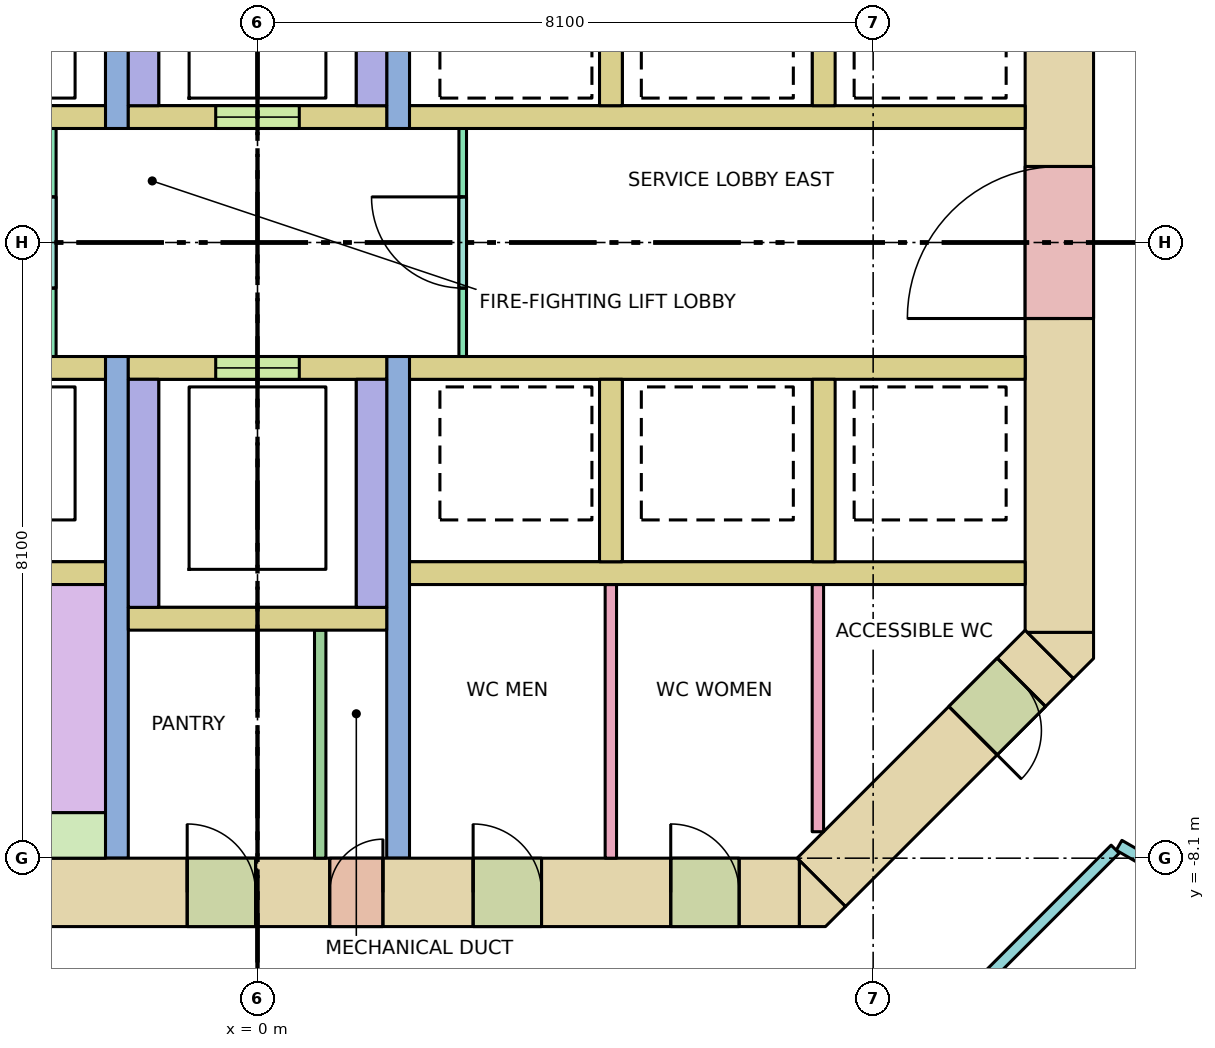
"""IFC4 building model, lengths in metres.
Left out: names, types, materials, properties, quantities, classifications, styles, units other than length and angle.
Written with IfcOpenShell. Run it as: python <this file> out.ifc"""

import sys

from ifc_helpers import new_model, si_unit, direction, frame, frame_2d, origin, place, context, subcontext, project, spatial, polyline, rectangle, outline, extrude, element, fill, save


model = new_model("IFC4")
c1 = context("Model", 3, precision=1e-05, world=origin(), true_north=direction((0.0, 1.0)))
c2 = subcontext(c1, "Body", "Model", "MODEL_VIEW")
j1 = project(units=[si_unit("LENGTHUNIT", "METRE"), si_unit("PLANEANGLEUNIT", "RADIAN")], contexts=[c1])
p1 = place(None, origin())
s1 = spatial("IfcSite", under=j1, at=p1, CompositionType="ELEMENT")
p2 = place(p1, origin())
s2 = spatial("IfcBuilding", under=s1, at=p2, CompositionType="ELEMENT")
p3 = place(p2, frame((0.0, 0.0, 39.0)))
s3 = spatial("IfcBuildingStorey", under=s2, at=p3, CompositionType="ELEMENT", Elevation=39.0)
p4 = place(p3, frame((-7.13, -8.55, -0.28), z_axis=(0.0, 0.0, 1.0), x_axis=(1.0, 0.0, 0.0)))
e1 = element("IfcWall", 1, at=p4, inside=s3, PredefinedType="SHEAR", context=c2, shape_type="SweptSolid", body=[
    extrude(rectangle(XDim=14.26, YDim=0.9, at=frame_2d((7.13, 0.0))), origin(), (0.0, 0.0, 1.0), 4.0),
])
p5 = place(p4, frame((8.08, 0.0, 0.28)))
e2 = element("IfcOpeningElement", 2, at=p5, cuts=e1, PredefinedType="OPENING", context=c2, shape_type="SweptSolid", body=[
    extrude(rectangle(XDim=0.7, YDim=2.1, at=frame_2d((0.35, 1.05))), frame((0.0, 0.46, 0.0), z_axis=(0.0, -1.0, 0.0), x_axis=(1.0, 0.0, 0.0)), (0.0, 0.0, 1.0), 0.92),
])
p6 = place(p4, frame((6.205, 0.0, 0.28)))
e3 = element("IfcOpeningElement", 3, at=p6, cuts=e1, PredefinedType="OPENING", context=c2, shape_type="SweptSolid", body=[
    extrude(rectangle(XDim=0.9, YDim=2.1, at=frame_2d((0.45, 1.05))), frame((0.0, 0.46, 0.0), z_axis=(0.0, -1.0, 0.0), x_axis=(1.0, 0.0, 0.0)), (0.0, 0.0, 1.0), 0.92),
])
p7 = place(p4, frame((9.967, 0.0, 0.28)))
e4 = element("IfcOpeningElement", 4, at=p7, cuts=e1, PredefinedType="OPENING", context=c2, shape_type="SweptSolid", body=[
    extrude(rectangle(XDim=0.9, YDim=2.1, at=frame_2d((0.45, 1.05))), frame((0.0, 0.46, 0.0), z_axis=(0.0, -1.0, 0.0), x_axis=(1.0, 0.0, 0.0)), (0.0, 0.0, 1.0), 0.92),
])
p8 = place(p4, frame((12.567, 0.0, 0.28)))
e5 = element("IfcOpeningElement", 5, at=p8, cuts=e1, PredefinedType="OPENING", context=c2, shape_type="SweptSolid", body=[
    extrude(rectangle(XDim=0.9, YDim=2.1, at=frame_2d((0.45, 1.05))), frame((0.0, 0.46, 0.0), z_axis=(0.0, -1.0, 0.0), x_axis=(1.0, 0.0, 0.0)), (0.0, 0.0, 1.0), 0.92),
])
p9 = place(p3, frame((10.55, -5.13, -0.28), z_axis=(0.0, 0.0, 1.0), x_axis=(0.0, 1.0, 0.0)))
e6 = element("IfcWall", 6, at=p9, inside=s3, PredefinedType="SHEAR", context=c2, shape_type="SweptSolid", body=[
    extrude(rectangle(XDim=10.26, YDim=0.9, at=frame_2d((5.13, 0.0))), origin(), (0.0, 0.0, 1.0), 4.0),
])
p10 = place(p9, frame((4.13, 0.0, 0.28)))
e7 = element("IfcOpeningElement", 7, at=p10, cuts=e6, PredefinedType="OPENING", context=c2, shape_type="SweptSolid", body=[
    extrude(rectangle(XDim=2.0, YDim=2.1, at=frame_2d((1.0, 1.05))), frame((0.0, 0.46, 0.0), z_axis=(0.0, -1.0, 0.0), x_axis=(1.0, 0.0, 0.0)), (0.0, 0.0, 1.0), 0.92),
])
p11 = place(p3, frame((10.418, -5.418, -0.28), z_axis=(0.0, 0.0, 1.0), x_axis=(-0.707106781187, -0.707106781187, 0.0)))
e8 = element("IfcWall", 8, at=p11, inside=s3, PredefinedType="SHEAR", context=c2, shape_type="SweptSolid", body=[
    extrude(rectangle(XDim=4.243, YDim=0.9, at=frame_2d((2.121, 0.0))), origin(), (0.0, 0.0, 1.0), 4.0),
])
p12 = place(p11, frame((0.52, 0.0, 0.28)))
e9 = element("IfcOpeningElement", 9, at=p12, cuts=e8, PredefinedType="OPENING", context=c2, shape_type="SweptSolid", body=[
    extrude(rectangle(XDim=0.9, YDim=2.1, at=frame_2d((0.45, 1.05))), frame((0.0, 0.46, 0.0), z_axis=(0.0, -1.0, 0.0), x_axis=(1.0, 0.0, 0.0)), (0.0, 0.0, 1.0), 0.92),
])
p13 = place(p3, frame((0.0, 0.0, -0.28)))
e10 = element("IfcWall", 10, at=p13, inside=s3, PredefinedType="SHEAR", context=c2, shape_type="SweptSolid", body=[
    extrude(outline(polyline([(7.473, -9.0), (7.13, -9.0), (7.13, -8.13), (7.736, -8.736), (7.473, -9.0)])), origin(), (0.0, 0.0, 1.0), 4.0),
])
p14 = place(p3, frame((0.0, 0.0, -0.28)))
e11 = element("IfcWall", 11, at=p14, inside=s3, PredefinedType="SHEAR", context=c2, shape_type="SweptSolid", body=[
    extrude(outline(polyline([(11.0, -5.473), (10.736, -5.736), (10.13, -5.13), (11.0, -5.13), (11.0, -5.473)])), origin(), (0.0, 0.0, 1.0), 4.0),
])
for number, where, z_axis, x_axis in (
    (12, (-10.1, -4.35, 0.0), (0.0, 0.0, 1.0), (1.0, 0.0, 0.0)),
    (13, (2.0, -4.35, 0.0), (0.0, 0.0, 1.0), (1.0, 0.0, 0.0)),
):
    element("IfcWall", number, at=place(p3, frame(where, z_axis=z_axis, x_axis=x_axis)), inside=s3, PredefinedType="SOLIDWALL", context=c2, shape_type="SweptSolid", body=[
        extrude(rectangle(XDim=8.1, YDim=0.3, at=frame_2d((4.05, 0.0))), origin(), (0.0, 0.0, 1.0), 3.72),
    ])
p15 = place(p3, frame((-10.1, 1.65, 0.0), z_axis=(0.0, 0.0, 1.0), x_axis=(1.0, 0.0, 0.0)))
e14 = element("IfcWall", 14, at=p15, inside=s3, PredefinedType="SOLIDWALL", context=c2, shape_type="SweptSolid", body=[
    extrude(rectangle(XDim=8.1, YDim=0.3, at=frame_2d((4.05, 0.0))), origin(), (0.0, 0.0, 1.0), 3.72),
])
p16 = place(p15, frame((0.7, 0.0, 0.0)))
e15 = element("IfcOpeningElement", 15, at=p16, cuts=e14, PredefinedType="OPENING", context=c2, shape_type="SweptSolid", body=[
    extrude(rectangle(XDim=1.1, YDim=2.1, at=frame_2d((0.55, 1.05))), frame((0.0, 0.16, 0.0), z_axis=(0.0, -1.0, 0.0), x_axis=(1.0, 0.0, 0.0)), (0.0, 0.0, 1.0), 0.32),
])
p17 = place(p15, frame((3.5, 0.0, 0.0)))
e16 = element("IfcOpeningElement", 16, at=p17, cuts=e14, PredefinedType="OPENING", context=c2, shape_type="SweptSolid", body=[
    extrude(rectangle(XDim=1.1, YDim=2.1, at=frame_2d((0.55, 1.05))), frame((0.0, 0.16, 0.0), z_axis=(0.0, -1.0, 0.0), x_axis=(1.0, 0.0, 0.0)), (0.0, 0.0, 1.0), 0.32),
])
p18 = place(p15, frame((6.15, 0.0, 0.0)))
e17 = element("IfcOpeningElement", 17, at=p18, cuts=e14, PredefinedType="OPENING", context=c2, shape_type="SweptSolid", body=[
    extrude(rectangle(XDim=1.1, YDim=2.1, at=frame_2d((0.55, 1.05))), frame((0.0, 0.16, 0.0), z_axis=(0.0, -1.0, 0.0), x_axis=(1.0, 0.0, 0.0)), (0.0, 0.0, 1.0), 0.32),
])
p19 = place(p3, frame((-10.1, -1.65, 0.0), z_axis=(0.0, 0.0, 1.0), x_axis=(1.0, 0.0, 0.0)))
e18 = element("IfcWall", 18, at=p19, inside=s3, PredefinedType="SOLIDWALL", context=c2, shape_type="SweptSolid", body=[
    extrude(rectangle(XDim=8.1, YDim=0.3, at=frame_2d((4.05, 0.0))), origin(), (0.0, 0.0, 1.0), 3.72),
])
p20 = place(p19, frame((0.7, 0.0, 0.0)))
e19 = element("IfcOpeningElement", 19, at=p20, cuts=e18, PredefinedType="OPENING", context=c2, shape_type="SweptSolid", body=[
    extrude(rectangle(XDim=1.1, YDim=2.1, at=frame_2d((0.55, 1.05))), frame((0.0, 0.16, 0.0), z_axis=(0.0, -1.0, 0.0), x_axis=(1.0, 0.0, 0.0)), (0.0, 0.0, 1.0), 0.32),
])
p21 = place(p19, frame((3.5, 0.0, 0.0)))
e20 = element("IfcOpeningElement", 20, at=p21, cuts=e18, PredefinedType="OPENING", context=c2, shape_type="SweptSolid", body=[
    extrude(rectangle(XDim=1.1, YDim=2.1, at=frame_2d((0.55, 1.05))), frame((0.0, 0.16, 0.0), z_axis=(0.0, -1.0, 0.0), x_axis=(1.0, 0.0, 0.0)), (0.0, 0.0, 1.0), 0.32),
])
p22 = place(p19, frame((6.15, 0.0, 0.0)))
e21 = element("IfcOpeningElement", 21, at=p22, cuts=e18, PredefinedType="OPENING", context=c2, shape_type="SweptSolid", body=[
    extrude(rectangle(XDim=1.1, YDim=2.1, at=frame_2d((0.55, 1.05))), frame((0.0, 0.16, 0.0), z_axis=(0.0, -1.0, 0.0), x_axis=(1.0, 0.0, 0.0)), (0.0, 0.0, 1.0), 0.32),
])
for number, where, z_axis, x_axis in (
    (22, (2.0, 1.65, 0.0), (0.0, 0.0, 1.0), (1.0, 0.0, 0.0)),
    (23, (2.0, -1.65, 0.0), (0.0, 0.0, 1.0), (1.0, 0.0, 0.0)),
):
    element("IfcWall", number, at=place(p3, frame(where, z_axis=z_axis, x_axis=x_axis)), inside=s3, PredefinedType="SOLIDWALL", context=c2, shape_type="SweptSolid", body=[
        extrude(rectangle(XDim=8.1, YDim=0.3, at=frame_2d((4.05, 0.0))), origin(), (0.0, 0.0, 1.0), 3.72),
    ])
for number, where, z_axis, x_axis in (
    (24, (4.65, 1.8, 0.0), (0.0, 0.0, 1.0), (0.0, 1.0, 0.0)),
    (25, (4.65, -4.2, 0.0), (0.0, 0.0, 1.0), (0.0, 1.0, 0.0)),
    (26, (7.45, 1.8, 0.0), (0.0, 0.0, 1.0), (0.0, 1.0, 0.0)),
    (27, (7.45, -4.2, 0.0), (0.0, 0.0, 1.0), (0.0, 1.0, 0.0)),
):
    element("IfcWall", number, at=place(p3, frame(where, z_axis=z_axis, x_axis=x_axis)), inside=s3, PredefinedType="SOLIDWALL", context=c2, shape_type="SweptSolid", body=[
        extrude(rectangle(XDim=2.4, YDim=0.3, at=frame_2d((1.2, 0.0))), origin(), (0.0, 0.0, 1.0), 3.72),
    ])
for number, where, z_axis, x_axis in (
    (28, (-1.85, 1.5, 0.0), (0.0, 0.0, 1.0), (0.0, 1.0, 0.0)),
    (29, (-1.85, -8.1, 0.0), (0.0, 0.0, 1.0), (0.0, 1.0, 0.0)),
    (30, (1.85, 1.5, 0.0), (0.0, 0.0, 1.0), (0.0, 1.0, 0.0)),
    (31, (1.85, -8.1, 0.0), (0.0, 0.0, 1.0), (0.0, 1.0, 0.0)),
):
    element("IfcWall", number, at=place(p3, frame(where, z_axis=z_axis, x_axis=x_axis)), inside=s3, PredefinedType="SHEAR", context=c2, shape_type="SweptSolid", body=[
        extrude(rectangle(XDim=6.6, YDim=0.3, at=frame_2d((3.3, 0.0))), origin(), (0.0, 0.0, 1.0), 3.72),
    ])
p23 = place(p3, frame((-1.7, 1.65, 0.0), z_axis=(0.0, 0.0, 1.0), x_axis=(1.0, 0.0, 0.0)))
e32 = element("IfcWall", 32, at=p23, inside=s3, PredefinedType="SOLIDWALL", context=c2, shape_type="SweptSolid", body=[
    extrude(rectangle(XDim=3.4, YDim=0.3, at=frame_2d((1.7, 0.0))), origin(), (0.0, 0.0, 1.0), 3.72),
])
p24 = place(p23, frame((1.15, 0.0, 0.0)))
e33 = element("IfcOpeningElement", 33, at=p24, cuts=e32, PredefinedType="OPENING", context=c2, shape_type="SweptSolid", body=[
    extrude(rectangle(XDim=1.1, YDim=2.1, at=frame_2d((0.55, 1.05))), frame((0.0, 0.16, 0.0), z_axis=(0.0, -1.0, 0.0), x_axis=(1.0, 0.0, 0.0)), (0.0, 0.0, 1.0), 0.32),
])
p25 = place(p3, frame((-1.7, -1.65, 0.0), z_axis=(0.0, 0.0, 1.0), x_axis=(1.0, 0.0, 0.0)))
e34 = element("IfcWall", 34, at=p25, inside=s3, PredefinedType="SOLIDWALL", context=c2, shape_type="SweptSolid", body=[
    extrude(rectangle(XDim=3.4, YDim=0.3, at=frame_2d((1.7, 0.0))), origin(), (0.0, 0.0, 1.0), 3.72),
])
p26 = place(p25, frame((1.15, 0.0, 0.0)))
e35 = element("IfcOpeningElement", 35, at=p26, cuts=e34, PredefinedType="OPENING", context=c2, shape_type="SweptSolid", body=[
    extrude(rectangle(XDim=1.1, YDim=2.1, at=frame_2d((0.55, 1.05))), frame((0.0, 0.16, 0.0), z_axis=(0.0, -1.0, 0.0), x_axis=(1.0, 0.0, 0.0)), (0.0, 0.0, 1.0), 0.32),
])
for number, where, z_axis, x_axis in (
    (36, (-1.5, 1.8, 0.0), (0.0, 0.0, 1.0), (0.0, 1.0, 0.0)),
    (37, (-1.5, -4.8, 0.0), (0.0, 0.0, 1.0), (0.0, 1.0, 0.0)),
    (38, (1.5, 1.8, 0.0), (0.0, 0.0, 1.0), (0.0, 1.0, 0.0)),
    (39, (1.5, -4.8, 0.0), (0.0, 0.0, 1.0), (0.0, 1.0, 0.0)),
):
    element("IfcWall", number, at=place(p3, frame(where, z_axis=z_axis, x_axis=x_axis)), inside=s3, PredefinedType="SOLIDWALL", context=c2, shape_type="SweptSolid", body=[
        extrude(rectangle(XDim=3.0, YDim=0.4, at=frame_2d((1.5, 0.0))), origin(), (0.0, 0.0, 1.0), 3.72),
    ])
p27 = place(p3, frame((-1.7, -4.95, 0.0), z_axis=(0.0, 0.0, 1.0), x_axis=(1.0, 0.0, 0.0)))
e40 = element("IfcWall", 40, at=p27, inside=s3, PredefinedType="SOLIDWALL", context=c2, shape_type="SweptSolid", body=[
    extrude(rectangle(XDim=3.4, YDim=0.3, at=frame_2d((1.7, 0.0))), origin(), (0.0, 0.0, 1.0), 3.72),
])
p28 = place(p3, frame((-7.37, -7.8, 0.0), z_axis=(0.0, 0.0, 1.0), x_axis=(1.0, 0.0, 0.0)))
e41 = element("IfcWall", 41, at=p28, inside=s3, PredefinedType="SHEAR", context=c2, shape_type="SweptSolid", body=[
    extrude(rectangle(XDim=5.37, YDim=0.6, at=frame_2d((2.685, 0.0))), origin(), (0.0, 0.0, 1.0), 3.72),
])
p29 = place(p3, frame((-2.7, -1.5, 0.0), z_axis=(0.0, 0.0, 1.0), x_axis=(0.0, 1.0, 0.0)))
e42 = element("IfcWall", 42, at=p29, inside=s3, PredefinedType="PARTITIONING", context=c2, shape_type="SweptSolid", body=[
    extrude(rectangle(XDim=3.0, YDim=0.1, at=frame_2d((1.5, 0.0))), origin(), (0.0, 0.0, 1.0), 3.72),
])
p30 = place(p29, frame((0.9, 0.0, 0.0)))
e43 = element("IfcOpeningElement", 43, at=p30, cuts=e42, PredefinedType="OPENING", context=c2, shape_type="SweptSolid", body=[
    extrude(rectangle(XDim=1.2, YDim=2.1, at=frame_2d((0.6, 1.05))), frame((0.0, 0.06, 0.0), z_axis=(0.0, -1.0, 0.0), x_axis=(1.0, 0.0, 0.0)), (0.0, 0.0, 1.0), 0.12),
])
p31 = place(p3, frame((2.7, -1.5, 0.0), z_axis=(0.0, 0.0, 1.0), x_axis=(0.0, 1.0, 0.0)))
e44 = element("IfcWall", 44, at=p31, inside=s3, PredefinedType="PARTITIONING", context=c2, shape_type="SweptSolid", body=[
    extrude(rectangle(XDim=3.0, YDim=0.1, at=frame_2d((1.5, 0.0))), origin(), (0.0, 0.0, 1.0), 3.72),
])
p32 = place(p31, frame((0.9, 0.0, 0.0)))
e45 = element("IfcOpeningElement", 45, at=p32, cuts=e44, PredefinedType="OPENING", context=c2, shape_type="SweptSolid", body=[
    extrude(rectangle(XDim=1.2, YDim=2.1, at=frame_2d((0.6, 1.05))), frame((0.0, 0.06, 0.0), z_axis=(0.0, -1.0, 0.0), x_axis=(1.0, 0.0, 0.0)), (0.0, 0.0, 1.0), 0.12),
])
p33 = place(p3, frame((0.825, -8.1, 0.0), z_axis=(0.0, 0.0, 1.0), x_axis=(0.0, 1.0, 0.0)))
e46 = element("IfcWall", 46, at=p33, inside=s3, PredefinedType="PARTITIONING", context=c2, shape_type="SweptSolid", body=[
    extrude(rectangle(XDim=3.0, YDim=0.15, at=frame_2d((1.5, 0.0))), origin(), (0.0, 0.0, 1.0), 3.72),
])
p34 = place(p3, frame((4.649, -8.1, 0.0), z_axis=(0.0, 0.0, 1.0), x_axis=(0.0, 1.0, 0.0)))
e47 = element("IfcWall", 47, at=p34, inside=s3, PredefinedType="PARTITIONING", context=c2, shape_type="SweptSolid", body=[
    extrude(rectangle(XDim=3.6, YDim=0.15, at=frame_2d((1.8, 0.0))), origin(), (0.0, 0.0, 1.0), 3.72),
])
p35 = place(p3, frame((7.373, -7.752, 0.0), z_axis=(0.0, 0.0, 1.0), x_axis=(0.0, 1.0, 0.0)))
e48 = element("IfcWall", 48, at=p35, inside=s3, PredefinedType="PARTITIONING", context=c2, shape_type="SweptSolid", body=[
    extrude(rectangle(XDim=3.252, YDim=0.15, at=frame_2d((1.626, 0.0))), origin(), (0.0, 0.0, 1.0), 3.72),
])
p36 = place(p3, frame((17.282, -11.364, 0.0), z_axis=(0.0, 0.0, 1.0), x_axis=(-0.86603341746, 0.49998611965, 0.0)))
e49 = element("IfcWall", 49, at=p36, inside=s3, PredefinedType="PARTITIONING", context=c2, shape_type="SweptSolid", body=[
    extrude(rectangle(XDim=6.866, YDim=0.15, at=frame_2d((3.433, 0.0))), origin(), (0.0, 0.0, 1.0), 3.72),
])
p37 = place(p36, frame((2.983, 0.0, 0.0)))
e50 = element("IfcOpeningElement", 50, at=p37, cuts=e49, PredefinedType="OPENING", context=c2, shape_type="SweptSolid", body=[
    extrude(rectangle(XDim=0.9, YDim=2.1, at=frame_2d((0.45, 1.05))), frame((0.0, 0.085, 0.0), z_axis=(0.0, -1.0, 0.0), x_axis=(1.0, 0.0, 0.0)), (0.0, 0.0, 1.0), 0.17),
])
p38 = place(p3, frame((11.284, -7.981, 0.0), z_axis=(0.0, 0.0, 1.0), x_axis=(-0.707077584218, -0.707135976949, 0.0)))
e51 = element("IfcWall", 51, at=p38, inside=s3, PredefinedType="PARTITIONING", context=c2, shape_type="SweptSolid", body=[
    extrude(rectangle(XDim=4.181, YDim=0.15, at=frame_2d((2.09, 0.0))), origin(), (0.0, 0.0, 1.0), 2.82),
])
p39 = place(p24, origin())
e52 = element("IfcDoor", 52, at=p39, inside=s3, OperationType="DOUBLE_DOOR_SLIDING", PredefinedType="DOOR", context=c2, shape_type="SweptSolid", body=[
    extrude(rectangle(XDim=1.1, YDim=2.1, at=frame_2d((0.55, 1.05))), frame((0.0, 0.025, 0.0), z_axis=(0.0, -1.0, 0.0), x_axis=(1.0, 0.0, 0.0)), (0.0, 0.0, 1.0), 0.05),
])
fill(e33, e52)
p40 = place(p26, origin())
e53 = element("IfcDoor", 53, at=p40, inside=s3, OperationType="DOUBLE_DOOR_SLIDING", PredefinedType="DOOR", context=c2, shape_type="SweptSolid", body=[
    extrude(rectangle(XDim=1.1, YDim=2.1, at=frame_2d((0.55, 1.05))), frame((0.0, 0.025, 0.0), z_axis=(0.0, -1.0, 0.0), x_axis=(1.0, 0.0, 0.0)), (0.0, 0.0, 1.0), 0.05),
])
fill(e35, e53)
p41 = place(p10, origin())
e54 = element("IfcDoor", 54, at=p41, inside=s3, OperationType="DOUBLE_DOOR_SINGLE_SWING", PredefinedType="DOOR", context=c2, shape_type="SweptSolid", body=[
    extrude(rectangle(XDim=2.0, YDim=2.1, at=frame_2d((1.0, 1.05))), frame((0.0, 0.025, 0.0), z_axis=(0.0, -1.0, 0.0), x_axis=(1.0, 0.0, 0.0)), (0.0, 0.0, 1.0), 0.05),
])
fill(e7, e54)
p42 = place(p30, origin())
e55 = element("IfcDoor", 55, at=p42, inside=s3, OperationType="SINGLE_SWING_RIGHT", PredefinedType="DOOR", context=c2, shape_type="SweptSolid", body=[
    extrude(rectangle(XDim=1.2, YDim=2.1, at=frame_2d((0.6, 1.05))), frame((0.0, 0.025, 0.0), z_axis=(0.0, -1.0, 0.0), x_axis=(1.0, 0.0, 0.0)), (0.0, 0.0, 1.0), 0.05),
])
fill(e43, e55)
p43 = place(p32, origin())
e56 = element("IfcDoor", 56, at=p43, inside=s3, OperationType="SINGLE_SWING_RIGHT", PredefinedType="DOOR", context=c2, shape_type="SweptSolid", body=[
    extrude(rectangle(XDim=1.2, YDim=2.1, at=frame_2d((0.6, 1.05))), frame((0.0, 0.025, 0.0), z_axis=(0.0, -1.0, 0.0), x_axis=(1.0, 0.0, 0.0)), (0.0, 0.0, 1.0), 0.05),
])
fill(e45, e56)
p44 = place(p5, origin())
e57 = element("IfcDoor", 57, at=p44, inside=s3, OperationType="SINGLE_SWING_RIGHT", PredefinedType="DOOR", context=c2, shape_type="SweptSolid", body=[
    extrude(rectangle(XDim=0.7, YDim=2.1, at=frame_2d((0.35, 1.05))), frame((0.0, 0.025, 0.0), z_axis=(0.0, -1.0, 0.0), x_axis=(1.0, 0.0, 0.0)), (0.0, 0.0, 1.0), 0.05),
])
fill(e2, e57)
p45 = place(p6, origin())
e58 = element("IfcDoor", 58, at=p45, inside=s3, OperationType="SINGLE_SWING_LEFT", PredefinedType="DOOR", context=c2, shape_type="SweptSolid", body=[
    extrude(rectangle(XDim=0.9, YDim=2.1, at=frame_2d((0.45, 1.05))), frame((0.0, 0.025, 0.0), z_axis=(0.0, -1.0, 0.0), x_axis=(1.0, 0.0, 0.0)), (0.0, 0.0, 1.0), 0.05),
])
fill(e3, e58)
p46 = place(p7, origin())
e59 = element("IfcDoor", 59, at=p46, inside=s3, OperationType="SINGLE_SWING_LEFT", PredefinedType="DOOR", context=c2, shape_type="SweptSolid", body=[
    extrude(rectangle(XDim=0.9, YDim=2.1, at=frame_2d((0.45, 1.05))), frame((0.0, 0.025, 0.0), z_axis=(0.0, -1.0, 0.0), x_axis=(1.0, 0.0, 0.0)), (0.0, 0.0, 1.0), 0.05),
])
fill(e4, e59)
p47 = place(p8, origin())
e60 = element("IfcDoor", 60, at=p47, inside=s3, OperationType="SINGLE_SWING_LEFT", PredefinedType="DOOR", context=c2, shape_type="SweptSolid", body=[
    extrude(rectangle(XDim=0.9, YDim=2.1, at=frame_2d((0.45, 1.05))), frame((0.0, 0.025, 0.0), z_axis=(0.0, -1.0, 0.0), x_axis=(1.0, 0.0, 0.0)), (0.0, 0.0, 1.0), 0.05),
])
fill(e5, e60)
p48 = place(p12, origin())
e61 = element("IfcDoor", 61, at=p48, inside=s3, OperationType="SINGLE_SWING_RIGHT", PredefinedType="DOOR", context=c2, shape_type="SweptSolid", body=[
    extrude(rectangle(XDim=0.9, YDim=2.1, at=frame_2d((0.45, 1.05))), frame((0.0, 0.025, 0.0), z_axis=(0.0, -1.0, 0.0), x_axis=(1.0, 0.0, 0.0)), (0.0, 0.0, 1.0), 0.05),
])
fill(e9, e61)
save(model, sys.argv[1])
